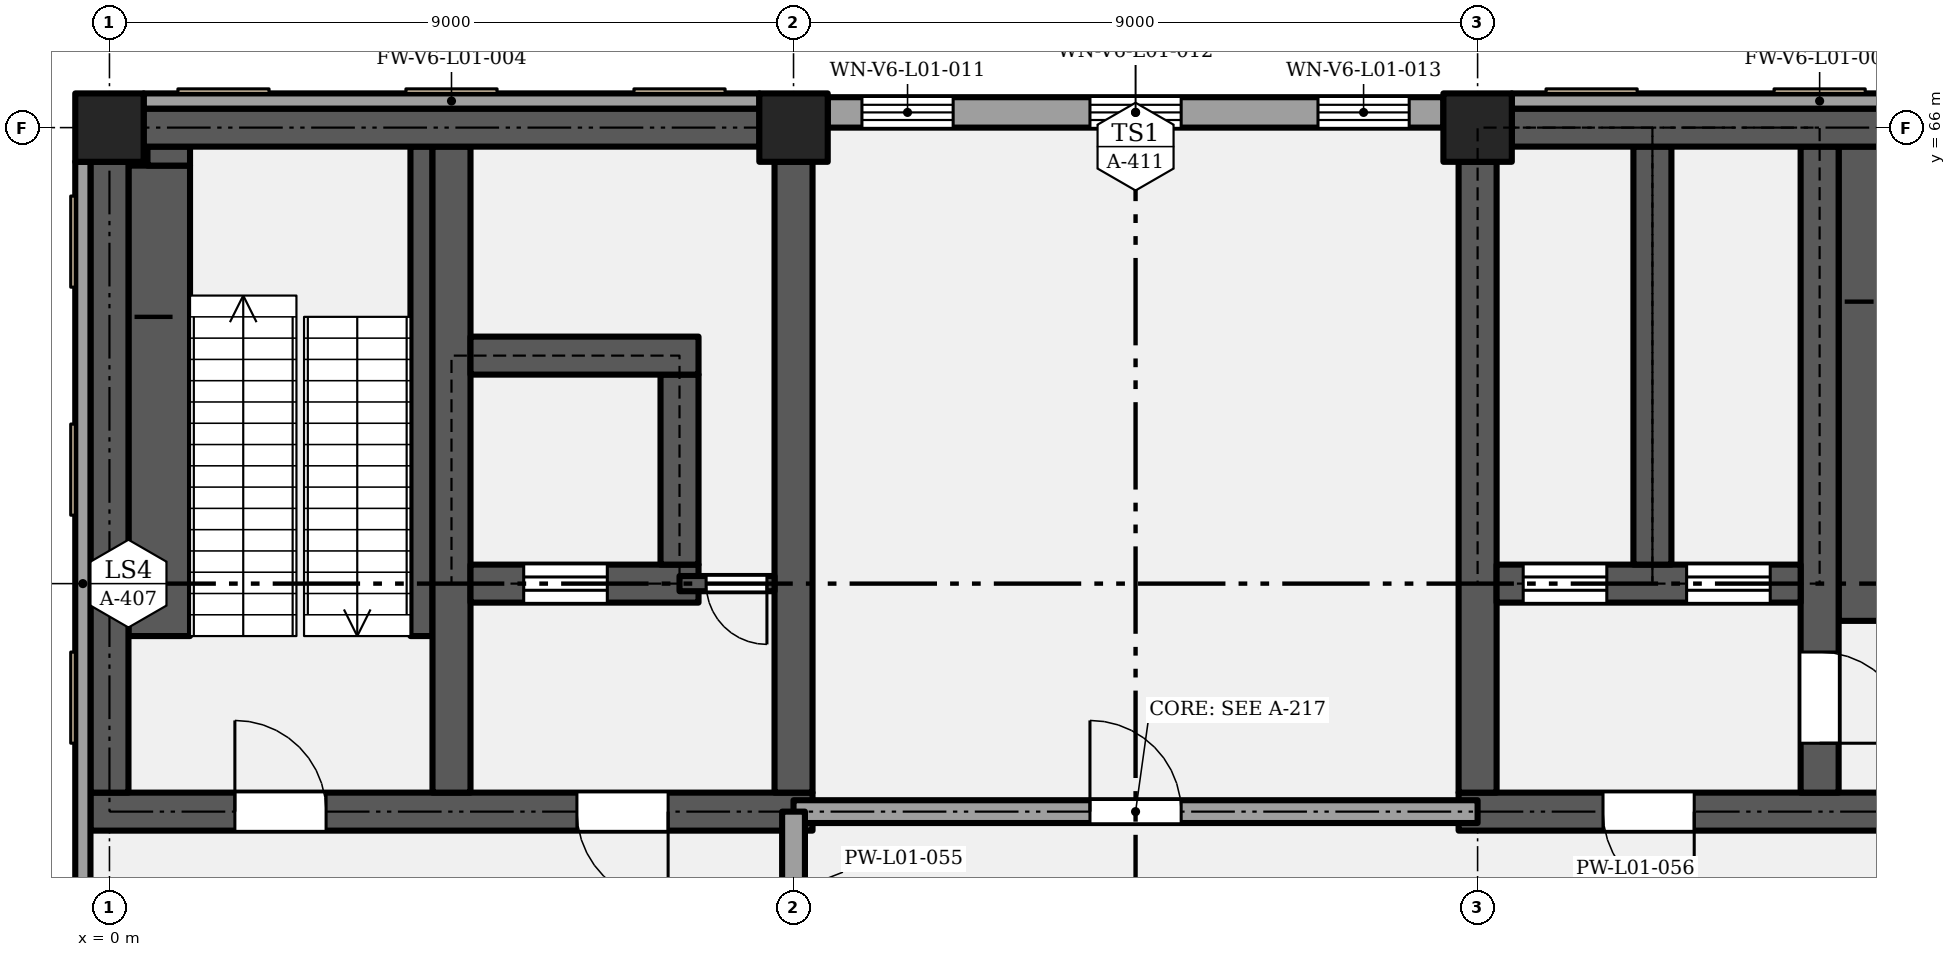
"""IFC4 building model, lengths in metres.
Left out: names, types, materials, properties, quantities, classifications, styles, units other than length and angle.
Written with IfcOpenShell. Run it as: python <this file> out.ifc"""

import sys

from ifc_helpers import new_model, si_unit, direction, frame, frame_2d, origin, origin_2d, place, context, subcontext, project, spatial, rectangle, extrude, element, fill, save


model = new_model("IFC4")
c1 = context("Model", 3, precision=1e-05, world=origin(), true_north=direction((0.0, 1.0)))
c2 = subcontext(c1, "Body", "Model", "MODEL_VIEW")
j1 = project(units=[si_unit("LENGTHUNIT", "METRE"), si_unit("PLANEANGLEUNIT", "RADIAN")], contexts=[c1])
p1 = place(None, origin())
s1 = spatial("IfcSite", under=j1, at=p1, CompositionType="ELEMENT")
p2 = place(p1, origin())
s2 = spatial("IfcBuilding", under=s1, at=p2, CompositionType="ELEMENT")
p3 = place(p2, frame((0.0, 0.0, 6.6)))
s3 = spatial("IfcBuildingStorey", under=s2, at=p3, CompositionType="ELEMENT", Elevation=6.6)
for number, where, z_axis, x_axis in (
    (1, (0.0, 66.0, 0.0), (0.0, 0.0, 1.0), (1.0, 0.0, 0.0)),
    (2, (9.0, 66.0, 0.0), (0.0, 0.0, 1.0), (1.0, 0.0, 0.0)),
    (3, (18.0, 66.0, 0.0), (0.0, 0.0, 1.0), (1.0, 0.0, 0.0)),
):
    element("IfcColumn", number, at=place(p3, frame(where, z_axis=z_axis, x_axis=x_axis)), inside=s3, PredefinedType="COLUMN", context=c2, shape_type="SweptSolid", body=[
        extrude(rectangle(XDim=0.9, YDim=0.9, at=origin_2d()), origin(), (0.0, 0.0, 1.0), 5.4),
    ])
p4 = place(p3, frame((-0.25, 57.0, 0.0), z_axis=(0.0, 0.0, 1.0), x_axis=(1.0, 0.0, 0.0)))
e4 = element("IfcWall", 4, at=p4, inside=s3, PredefinedType="SHEAR", context=c2, shape_type="SweptSolid", body=[
    extrude(rectangle(XDim=9.5, YDim=0.5, at=frame_2d((4.75, 0.0))), origin(), (0.0, 0.0, 1.0), 5.1),
])
p5 = place(p4, frame((1.9, 0.0, 0.0)))
e5 = element("IfcOpeningElement", 5, at=p5, cuts=e4, PredefinedType="OPENING", context=c2, shape_type="SweptSolid", body=[
    extrude(rectangle(XDim=1.2, YDim=2.1, at=frame_2d((0.6, 1.05))), frame((0.0, 0.26, 0.0), z_axis=(0.0, -1.0, 0.0), x_axis=(1.0, 0.0, 0.0)), (0.0, 0.0, 1.0), 0.52),
])
p6 = place(p4, frame((7.6, 0.0, 0.0), z_axis=(0.0, 0.0, 1.0), x_axis=(-1.0, 0.0, 0.0)))
e6 = element("IfcOpeningElement", 6, at=p6, cuts=e4, PredefinedType="OPENING", context=c2, shape_type="SweptSolid", body=[
    extrude(rectangle(XDim=1.2, YDim=2.1, at=frame_2d((0.6, 1.05))), frame((0.0, 0.26, 0.0), z_axis=(0.0, -1.0, 0.0), x_axis=(1.0, 0.0, 0.0)), (0.0, 0.0, 1.0), 0.52),
])
p7 = place(p3, frame((17.75, 57.0, 0.0), z_axis=(0.0, 0.0, 1.0), x_axis=(1.0, 0.0, 0.0)))
e7 = element("IfcWall", 7, at=p7, inside=s3, PredefinedType="SHEAR", context=c2, shape_type="SweptSolid", body=[
    extrude(rectangle(XDim=9.5, YDim=0.5, at=frame_2d((4.75, 0.0))), origin(), (0.0, 0.0, 1.0), 5.1),
])
p8 = place(p7, frame((3.1, 0.0, 0.0), z_axis=(0.0, 0.0, 1.0), x_axis=(-1.0, 0.0, 0.0)))
e8 = element("IfcOpeningElement", 8, at=p8, cuts=e7, PredefinedType="OPENING", context=c2, shape_type="SweptSolid", body=[
    extrude(rectangle(XDim=1.2, YDim=2.1, at=frame_2d((0.6, 1.05))), frame((0.0, 0.26, 0.0), z_axis=(0.0, -1.0, 0.0), x_axis=(1.0, 0.0, 0.0)), (0.0, 0.0, 1.0), 0.52),
])
p9 = place(p7, frame((6.4, 0.0, 0.0)))
e9 = element("IfcOpeningElement", 9, at=p9, cuts=e7, PredefinedType="OPENING", context=c2, shape_type="SweptSolid", body=[
    extrude(rectangle(XDim=1.2, YDim=2.1, at=frame_2d((0.6, 1.05))), frame((0.0, 0.26, 0.0), z_axis=(0.0, -1.0, 0.0), x_axis=(1.0, 0.0, 0.0)), (0.0, 0.0, 1.0), 0.52),
])
p10 = place(p3, frame((0.0, 57.25, 0.0), z_axis=(0.0, 0.0, 1.0), x_axis=(0.0, 1.0, 0.0)))
e10 = element("IfcWall", 10, at=p10, inside=s3, PredefinedType="SHEAR", context=c2, shape_type="SweptSolid", body=[
    extrude(rectangle(XDim=8.3, YDim=0.5, at=frame_2d((4.15, 0.0))), origin(), (0.0, 0.0, 1.0), 5.1),
])
p11 = place(p3, frame((4.5, 57.25, 0.0), z_axis=(0.0, 0.0, 1.0), x_axis=(0.0, 1.0, 0.0)))
e11 = element("IfcWall", 11, at=p11, inside=s3, PredefinedType="SHEAR", context=c2, shape_type="SweptSolid", body=[
    extrude(rectangle(XDim=8.5, YDim=0.5, at=frame_2d((4.25, 0.0))), origin(), (0.0, 0.0, 1.0), 5.1),
])
for number, where, z_axis, x_axis in (
    (12, (9.0, 57.25, 0.0), (0.0, 0.0, 1.0), (0.0, 1.0, 0.0)),
    (13, (18.0, 57.25, 0.0), (0.0, 0.0, 1.0), (0.0, 1.0, 0.0)),
):
    element("IfcWall", number, at=place(p3, frame(where, z_axis=z_axis, x_axis=x_axis)), inside=s3, PredefinedType="SHEAR", context=c2, shape_type="SweptSolid", body=[
        extrude(rectangle(XDim=8.3, YDim=0.5, at=frame_2d((4.15, 0.0))), origin(), (0.0, 0.0, 1.0), 5.1),
    ])
p12 = place(p3, frame((22.5, 57.25, 0.0), z_axis=(0.0, 0.0, 1.0), x_axis=(0.0, 1.0, 0.0)))
e14 = element("IfcWall", 14, at=p12, inside=s3, PredefinedType="SHEAR", context=c2, shape_type="SweptSolid", body=[
    extrude(rectangle(XDim=8.5, YDim=0.5, at=frame_2d((4.25, 0.0))), origin(), (0.0, 0.0, 1.0), 5.1),
])
p13 = place(p12, frame((1.85, 0.0, 0.0), z_axis=(0.0, 0.0, 1.0), x_axis=(-1.0, 0.0, 0.0)))
e15 = element("IfcOpeningElement", 15, at=p13, cuts=e14, PredefinedType="OPENING", context=c2, shape_type="SweptSolid", body=[
    extrude(rectangle(XDim=1.2, YDim=2.1, at=frame_2d((0.6, 1.05))), frame((0.0, 0.26, 0.0), z_axis=(0.0, -1.0, 0.0), x_axis=(1.0, 0.0, 0.0)), (0.0, 0.0, 1.0), 0.52),
])
p14 = place(p3, frame((4.75, 60.0, 0.0), z_axis=(0.0, 0.0, 1.0), x_axis=(1.0, 0.0, 0.0)))
e16 = element("IfcWall", 16, at=p14, inside=s3, PredefinedType="SHEAR", context=c2, shape_type="SweptSolid", body=[
    extrude(rectangle(XDim=3.0, YDim=0.5, at=frame_2d((1.5, 0.0))), origin(), (0.0, 0.0, 1.0), 5.1),
])
p15 = place(p14, frame((0.7, 0.0, 0.0)))
e17 = element("IfcOpeningElement", 17, at=p15, cuts=e16, PredefinedType="OPENING", context=c2, shape_type="SweptSolid", body=[
    extrude(rectangle(XDim=1.1, YDim=2.1, at=frame_2d((0.55, 1.05))), frame((0.0, 0.26, 0.0), z_axis=(0.0, -1.0, 0.0), x_axis=(1.0, 0.0, 0.0)), (0.0, 0.0, 1.0), 0.52),
])
p16 = place(p3, frame((18.25, 60.0, 0.0), z_axis=(0.0, 0.0, 1.0), x_axis=(1.0, 0.0, 0.0)))
e18 = element("IfcWall", 18, at=p16, inside=s3, PredefinedType="SHEAR", context=c2, shape_type="SweptSolid", body=[
    extrude(rectangle(XDim=4.0, YDim=0.5, at=frame_2d((2.0, 0.0))), origin(), (0.0, 0.0, 1.0), 5.1),
])
p17 = place(p16, frame((0.35, 0.0, 0.0)))
e19 = element("IfcOpeningElement", 19, at=p17, cuts=e18, PredefinedType="OPENING", context=c2, shape_type="SweptSolid", body=[
    extrude(rectangle(XDim=1.1, YDim=2.1, at=frame_2d((0.55, 1.05))), frame((0.0, 0.26, 0.0), z_axis=(0.0, -1.0, 0.0), x_axis=(1.0, 0.0, 0.0)), (0.0, 0.0, 1.0), 0.52),
])
p18 = place(p16, frame((2.5, 0.0, 0.0)))
e20 = element("IfcOpeningElement", 20, at=p18, cuts=e18, PredefinedType="OPENING", context=c2, shape_type="SweptSolid", body=[
    extrude(rectangle(XDim=1.1, YDim=2.1, at=frame_2d((0.55, 1.05))), frame((0.0, 0.26, 0.0), z_axis=(0.0, -1.0, 0.0), x_axis=(1.0, 0.0, 0.0)), (0.0, 0.0, 1.0), 0.52),
])
p19 = place(p3, frame((7.5, 60.25, 0.0), z_axis=(0.0, 0.0, 1.0), x_axis=(0.0, 1.0, 0.0)))
e21 = element("IfcWall", 21, at=p19, inside=s3, PredefinedType="SHEAR", context=c2, shape_type="SweptSolid", body=[
    extrude(rectangle(XDim=2.5, YDim=0.5, at=frame_2d((1.25, 0.0))), origin(), (0.0, 0.0, 1.0), 5.1),
])
p20 = place(p3, frame((20.3, 60.25, 0.0), z_axis=(0.0, 0.0, 1.0), x_axis=(0.0, 1.0, 0.0)))
e22 = element("IfcWall", 22, at=p20, inside=s3, PredefinedType="SHEAR", context=c2, shape_type="SweptSolid", body=[
    extrude(rectangle(XDim=5.5, YDim=0.5, at=frame_2d((2.75, 0.0))), origin(), (0.0, 0.0, 1.0), 5.1),
])
p21 = place(p3, frame((4.75, 63.0, 0.0), z_axis=(0.0, 0.0, 1.0), x_axis=(1.0, 0.0, 0.0)))
e23 = element("IfcWall", 23, at=p21, inside=s3, PredefinedType="SHEAR", context=c2, shape_type="SweptSolid", body=[
    extrude(rectangle(XDim=3.0, YDim=0.5, at=frame_2d((1.5, 0.0))), origin(), (0.0, 0.0, 1.0), 5.1),
])
for number, where, z_axis, x_axis in (
    (24, (0.45, 66.0, 0.0), (0.0, 0.0, 1.0), (1.0, 0.0, 0.0)),
    (25, (18.45, 66.0, 0.0), (0.0, 0.0, 1.0), (1.0, 0.0, 0.0)),
):
    element("IfcWall", number, at=place(p3, frame(where, z_axis=z_axis, x_axis=x_axis)), inside=s3, PredefinedType="SHEAR", context=c2, shape_type="SweptSolid", body=[
        extrude(rectangle(XDim=8.1, YDim=0.5, at=frame_2d((4.05, 0.0))), origin(), (0.0, 0.0, 1.0), 5.1),
    ])
p22 = place(p3, frame((0.45, 66.35, 0.0), z_axis=(0.0, 0.0, 1.0), x_axis=(1.0, 0.0, 0.0)))
e26 = element("IfcWall", 26, at=p22, inside=s3, PredefinedType="SOLIDWALL", context=c2, shape_type="SweptSolid", body=[
    extrude(rectangle(XDim=8.1, YDim=0.2, at=frame_2d((4.05, 0.0))), origin(), (0.0, 0.0, 1.0), 5.1),
])
p23 = place(p3, frame((9.45, 66.2, 0.0), z_axis=(0.0, 0.0, 1.0), x_axis=(1.0, 0.0, 0.0)))
e27 = element("IfcWall", 27, at=p23, inside=s3, PredefinedType="SOLIDWALL", context=c2, shape_type="SweptSolid", body=[
    extrude(rectangle(XDim=8.1, YDim=0.4, at=frame_2d((4.05, 0.0))), origin(), (0.0, 0.0, 1.0), 5.1),
])
p24 = place(p23, frame((0.45, 0.0, 0.9)))
e28 = element("IfcOpeningElement", 28, at=p24, cuts=e27, PredefinedType="OPENING", context=c2, shape_type="SweptSolid", body=[
    extrude(rectangle(XDim=1.2, YDim=2.4, at=frame_2d((0.6, 1.2))), frame((0.0, 0.21, 0.0), z_axis=(0.0, -1.0, 0.0), x_axis=(1.0, 0.0, 0.0)), (0.0, 0.0, 1.0), 0.42),
])
p25 = place(p23, frame((3.45, 0.0, 0.9)))
e29 = element("IfcOpeningElement", 29, at=p25, cuts=e27, PredefinedType="OPENING", context=c2, shape_type="SweptSolid", body=[
    extrude(rectangle(XDim=1.2, YDim=2.4, at=frame_2d((0.6, 1.2))), frame((0.0, 0.21, 0.0), z_axis=(0.0, -1.0, 0.0), x_axis=(1.0, 0.0, 0.0)), (0.0, 0.0, 1.0), 0.42),
])
p26 = place(p23, frame((6.45, 0.0, 0.9)))
e30 = element("IfcOpeningElement", 30, at=p26, cuts=e27, PredefinedType="OPENING", context=c2, shape_type="SweptSolid", body=[
    extrude(rectangle(XDim=1.2, YDim=2.4, at=frame_2d((0.6, 1.2))), frame((0.0, 0.21, 0.0), z_axis=(0.0, -1.0, 0.0), x_axis=(1.0, 0.0, 0.0)), (0.0, 0.0, 1.0), 0.42),
])
p27 = place(p3, frame((18.45, 66.35, 0.0), z_axis=(0.0, 0.0, 1.0), x_axis=(1.0, 0.0, 0.0)))
e31 = element("IfcWall", 31, at=p27, inside=s3, PredefinedType="SOLIDWALL", context=c2, shape_type="SweptSolid", body=[
    extrude(rectangle(XDim=8.1, YDim=0.2, at=frame_2d((4.05, 0.0))), origin(), (0.0, 0.0, 1.0), 5.1),
])
p28 = place(p3, frame((-0.35, 54.45, 0.0), z_axis=(0.0, 0.0, 1.0), x_axis=(0.0, 1.0, 0.0)))
e32 = element("IfcWall", 32, at=p28, inside=s3, PredefinedType="SOLIDWALL", context=c2, shape_type="SweptSolid", body=[
    extrude(rectangle(XDim=11.1, YDim=0.2, at=frame_2d((5.55, 0.0))), origin(), (0.0, 0.0, 1.0), 5.1),
])
p29 = place(p28, frame((0.45, 0.0, 0.9)))
e33 = element("IfcOpeningElement", 33, at=p29, cuts=e32, PredefinedType="OPENING", context=c2, shape_type="SweptSolid", body=[
    extrude(rectangle(XDim=1.2, YDim=2.4, at=frame_2d((0.6, 1.2))), frame((0.0, 0.11, 0.0), z_axis=(0.0, -1.0, 0.0), x_axis=(1.0, 0.0, 0.0)), (0.0, 0.0, 1.0), 0.22),
])
p30 = place(p3, frame((9.0, 57.0, 0.0), z_axis=(0.0, 0.0, 1.0), x_axis=(1.0, 0.0, 0.0)))
e34 = element("IfcWall", 34, at=p30, inside=s3, PredefinedType="PARTITIONING", context=c2, shape_type="SweptSolid", body=[
    extrude(rectangle(XDim=9.0, YDim=0.3, at=frame_2d((4.5, 0.0))), origin(), (0.0, 0.0, 1.0), 5.1),
])
p31 = place(p30, frame((3.9, 0.0, 0.0)))
e35 = element("IfcOpeningElement", 35, at=p31, cuts=e34, PredefinedType="OPENING", context=c2, shape_type="SweptSolid", body=[
    extrude(rectangle(XDim=1.2, YDim=2.1, at=frame_2d((0.6, 1.05))), frame((0.0, 0.16, 0.0), z_axis=(0.0, -1.0, 0.0), x_axis=(1.0, 0.0, 0.0)), (0.0, 0.0, 1.0), 0.32),
])
p32 = place(p3, frame((7.5, 60.0, 0.0), z_axis=(0.0, 0.0, 1.0), x_axis=(1.0, 0.0, 0.0)))
e36 = element("IfcWall", 36, at=p32, inside=s3, PredefinedType="SHEAR", context=c2, shape_type="SweptSolid", body=[
    extrude(rectangle(XDim=1.25, YDim=0.2, at=frame_2d((0.625, 0.0))), origin(), (0.0, 0.0, 1.0), 5.1),
])
p33 = place(p32, frame((1.15, 0.0, 0.0), z_axis=(0.0, 0.0, 1.0), x_axis=(-1.0, 0.0, 0.0)))
e37 = element("IfcOpeningElement", 37, at=p33, cuts=e36, PredefinedType="OPENING", context=c2, shape_type="SweptSolid", body=[
    extrude(rectangle(XDim=0.8, YDim=2.0, at=frame_2d((0.4, 1.0))), frame((0.0, 0.11, 0.0), z_axis=(0.0, -1.0, 0.0), x_axis=(1.0, 0.0, 0.0)), (0.0, 0.0, 1.0), 0.22),
])
p34 = place(p3, frame((9.0, 54.5, 0.0), z_axis=(0.0, 0.0, 1.0), x_axis=(0.0, 1.0, 0.0)))
e38 = element("IfcWall", 38, at=p34, inside=s3, PredefinedType="PARTITIONING", context=c2, shape_type="SweptSolid", body=[
    extrude(rectangle(XDim=2.5, YDim=0.3, at=frame_2d((1.25, 0.0))), origin(), (0.0, 0.0, 1.0), 4.35),
])
p35 = place(p3, frame((23.095, 59.51, 0.0), z_axis=(0.0, 0.0, 1.0), x_axis=(0.0, 1.0, 0.0)))
e39 = element("IfcWall", 39, at=p35, inside=s3, PredefinedType="SHEAR", context=c2, shape_type="SweptSolid", body=[
    extrude(rectangle(XDim=6.24, YDim=0.69, at=frame_2d((3.12, 0.0))), origin(), (0.0, 0.0, 1.0), 2.587),
])
p36 = place(p3, frame((0.655, 59.31, 0.0), z_axis=(0.0, 0.0, 1.0), x_axis=(0.0, 1.0, 0.0)))
e40 = element("IfcWall", 40, at=p36, inside=s3, PredefinedType="SHEAR", context=c2, shape_type="SweptSolid", body=[
    extrude(rectangle(XDim=6.19, YDim=0.81, at=frame_2d((3.095, 0.0))), origin(), (0.0, 0.0, 1.0), 2.587),
])
p37 = place(p3, frame((0.78, 65.5, 0.0), z_axis=(0.0, 0.0, 1.0), x_axis=(0.0, 1.0, 0.0)))
e41 = element("IfcWall", 41, at=p37, inside=s3, PredefinedType="SHEAR", context=c2, shape_type="SweptSolid", body=[
    extrude(rectangle(XDim=0.25, YDim=0.56, at=frame_2d((0.125, 0.0))), origin(), (0.0, 0.0, 1.0), 2.587),
])
p38 = place(p3, frame((4.105, 59.31, 0.0), z_axis=(0.0, 0.0, 1.0), x_axis=(0.0, 1.0, 0.0)))
e42 = element("IfcWall", 42, at=p38, inside=s3, PredefinedType="SHEAR", context=c2, shape_type="SweptSolid", body=[
    extrude(rectangle(XDim=6.44, YDim=0.29, at=frame_2d((3.22, 0.0))), origin(), (0.0, 0.0, 1.0), 2.587),
])
p39 = place(p24, origin())
e43 = element("IfcWindow", 43, at=p39, inside=s3, PartitioningType="SINGLE_PANEL", PredefinedType="WINDOW", context=c2, shape_type="SweptSolid", body=[
    extrude(rectangle(XDim=1.2, YDim=2.4, at=frame_2d((0.6, 1.2))), frame((0.0, 0.03, 0.0), z_axis=(0.0, -1.0, 0.0), x_axis=(1.0, 0.0, 0.0)), (0.0, 0.0, 1.0), 0.06),
])
fill(e28, e43)
p40 = place(p25, origin())
e44 = element("IfcWindow", 44, at=p40, inside=s3, PartitioningType="SINGLE_PANEL", PredefinedType="WINDOW", context=c2, shape_type="SweptSolid", body=[
    extrude(rectangle(XDim=1.2, YDim=2.4, at=frame_2d((0.6, 1.2))), frame((0.0, 0.03, 0.0), z_axis=(0.0, -1.0, 0.0), x_axis=(1.0, 0.0, 0.0)), (0.0, 0.0, 1.0), 0.06),
])
fill(e29, e44)
p41 = place(p26, origin())
e45 = element("IfcWindow", 45, at=p41, inside=s3, PartitioningType="SINGLE_PANEL", PredefinedType="WINDOW", context=c2, shape_type="SweptSolid", body=[
    extrude(rectangle(XDim=1.2, YDim=2.4, at=frame_2d((0.6, 1.2))), frame((0.0, 0.03, 0.0), z_axis=(0.0, -1.0, 0.0), x_axis=(1.0, 0.0, 0.0)), (0.0, 0.0, 1.0), 0.06),
])
fill(e30, e45)
p42 = place(p5, origin())
e46 = element("IfcDoor", 46, at=p42, inside=s3, OperationType="SINGLE_SWING_LEFT", PredefinedType="DOOR", context=c2, shape_type="SweptSolid", body=[
    extrude(rectangle(XDim=1.2, YDim=2.1, at=frame_2d((0.6, 1.05))), frame((0.0, 0.025, 0.0), z_axis=(0.0, -1.0, 0.0), x_axis=(1.0, 0.0, 0.0)), (0.0, 0.0, 1.0), 0.05),
])
fill(e5, e46)
p43 = place(p6, origin())
e47 = element("IfcDoor", 47, at=p43, inside=s3, OperationType="SINGLE_SWING_LEFT", PredefinedType="DOOR", context=c2, shape_type="SweptSolid", body=[
    extrude(rectangle(XDim=1.2, YDim=2.1, at=frame_2d((0.6, 1.05))), frame((0.0, 0.025, 0.0), z_axis=(0.0, -1.0, 0.0), x_axis=(1.0, 0.0, 0.0)), (0.0, 0.0, 1.0), 0.05),
])
fill(e6, e47)
p44 = place(p15, origin())
e48 = element("IfcDoor", 48, at=p44, inside=s3, OperationType="SLIDING_TO_LEFT", PredefinedType="DOOR", context=c2, shape_type="SweptSolid", body=[
    extrude(rectangle(XDim=1.1, YDim=2.1, at=frame_2d((0.55, 1.05))), frame((0.0, 0.025, 0.0), z_axis=(0.0, -1.0, 0.0), x_axis=(1.0, 0.0, 0.0)), (0.0, 0.0, 1.0), 0.05),
])
fill(e17, e48)
p45 = place(p33, origin())
e49 = element("IfcDoor", 49, at=p45, inside=s3, OperationType="SINGLE_SWING_LEFT", PredefinedType="DOOR", context=c2, shape_type="SweptSolid", body=[
    extrude(rectangle(XDim=0.8, YDim=2.0, at=frame_2d((0.4, 1.0))), frame((0.0, 0.025, 0.0), z_axis=(0.0, -1.0, 0.0), x_axis=(1.0, 0.0, 0.0)), (0.0, 0.0, 1.0), 0.05),
])
fill(e37, e49)
p46 = place(p8, origin())
e50 = element("IfcDoor", 50, at=p46, inside=s3, OperationType="SINGLE_SWING_LEFT", PredefinedType="DOOR", context=c2, shape_type="SweptSolid", body=[
    extrude(rectangle(XDim=1.2, YDim=2.1, at=frame_2d((0.6, 1.05))), frame((0.0, 0.025, 0.0), z_axis=(0.0, -1.0, 0.0), x_axis=(1.0, 0.0, 0.0)), (0.0, 0.0, 1.0), 0.05),
])
fill(e8, e50)
p47 = place(p17, origin())
e51 = element("IfcDoor", 51, at=p47, inside=s3, OperationType="SLIDING_TO_LEFT", PredefinedType="DOOR", context=c2, shape_type="SweptSolid", body=[
    extrude(rectangle(XDim=1.1, YDim=2.1, at=frame_2d((0.55, 1.05))), frame((0.0, 0.025, 0.0), z_axis=(0.0, -1.0, 0.0), x_axis=(1.0, 0.0, 0.0)), (0.0, 0.0, 1.0), 0.05),
])
fill(e19, e51)
p48 = place(p18, origin())
e52 = element("IfcDoor", 52, at=p48, inside=s3, OperationType="SLIDING_TO_LEFT", PredefinedType="DOOR", context=c2, shape_type="SweptSolid", body=[
    extrude(rectangle(XDim=1.1, YDim=2.1, at=frame_2d((0.55, 1.05))), frame((0.0, 0.025, 0.0), z_axis=(0.0, -1.0, 0.0), x_axis=(1.0, 0.0, 0.0)), (0.0, 0.0, 1.0), 0.05),
])
fill(e20, e52)
p49 = place(p13, origin())
e53 = element("IfcDoor", 53, at=p49, inside=s3, OperationType="SINGLE_SWING_RIGHT", PredefinedType="DOOR", context=c2, shape_type="SweptSolid", body=[
    extrude(rectangle(XDim=1.2, YDim=2.1, at=frame_2d((0.6, 1.05))), frame((0.0, 0.025, 0.0), z_axis=(0.0, -1.0, 0.0), x_axis=(1.0, 0.0, 0.0)), (0.0, 0.0, 1.0), 0.05),
])
fill(e15, e53)
p50 = place(p31, origin())
e54 = element("IfcDoor", 54, at=p50, inside=s3, OperationType="SINGLE_SWING_LEFT", PredefinedType="DOOR", context=c2, shape_type="SweptSolid", body=[
    extrude(rectangle(XDim=1.2, YDim=2.1, at=frame_2d((0.6, 1.05))), frame((0.0, 0.025, 0.0), z_axis=(0.0, -1.0, 0.0), x_axis=(1.0, 0.0, 0.0)), (0.0, 0.0, 1.0), 0.05),
])
fill(e35, e54)
save(model, sys.argv[1])
